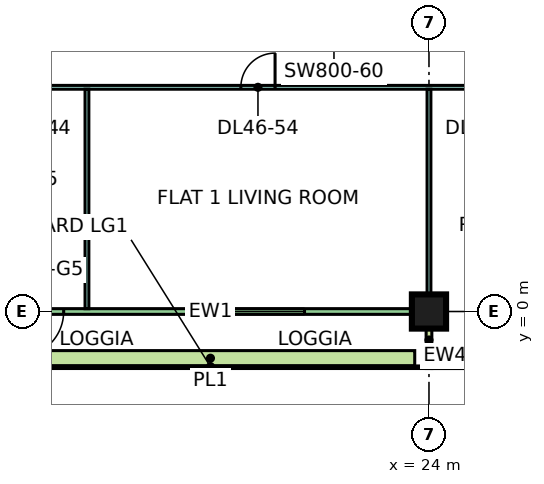
"""IFC4 building model, lengths in metres.
Left out: names, types, materials, properties, quantities, classifications, styles, units other than length and angle.
Written with IfcOpenShell. Run it as: python <this file> out.ifc"""

import sys

from ifc_helpers import new_model, si_unit, direction, frame, frame_2d, origin, origin_2d, place, context, subcontext, project, spatial, rectangle, extrude, element, fill, save


model = new_model("IFC4")
c1 = context("Model", 3, precision=1e-05, world=origin(), true_north=direction((0.0, 1.0)))
c2 = subcontext(c1, "Body", "Model", "MODEL_VIEW")
j1 = project(units=[si_unit("LENGTHUNIT", "METRE"), si_unit("PLANEANGLEUNIT", "RADIAN")], contexts=[c1])
p1 = place(None, origin())
s1 = spatial("IfcSite", under=j1, at=p1, CompositionType="ELEMENT")
p2 = place(p1, origin())
s2 = spatial("IfcBuilding", under=s1, at=p2, CompositionType="ELEMENT")
p3 = place(p2, frame((0.0, 0.0, 198.65)))
s3 = spatial("IfcBuildingStorey", under=s2, at=p3, CompositionType="ELEMENT", Elevation=198.65)
p4 = place(p3, frame((24.0, 0.0, 0.0), z_axis=(0.0, 0.0, 1.0), x_axis=(1.0, 0.0, 0.0)))
e1 = element("IfcColumn", 1, at=p4, inside=s3, PredefinedType="COLUMN", context=c2, shape_type="SweptSolid", body=[
    extrude(rectangle(XDim=0.9, YDim=0.9, at=origin_2d()), origin(), (0.0, 0.0, 1.0), 3.75),
])
p5 = place(p3, frame((12.575, 0.0, 0.0), z_axis=(0.0, 0.0, 1.0), x_axis=(1.0, 0.0, 0.0)))
e2 = element("IfcWall", 2, at=p5, inside=s3, PredefinedType="SOLIDWALL", context=c2, shape_type="SweptSolid", body=[
    extrude(rectangle(XDim=11.35, YDim=0.15, at=frame_2d((5.675, 0.0))), origin(), (0.0, 0.0, 1.0), 3.35),
])
p6 = place(p5, frame((0.613, 0.0, 0.0)))
e3 = element("IfcOpeningElement", 3, at=p6, cuts=e2, PredefinedType="OPENING", context=c2, shape_type="SweptSolid", body=[
    extrude(rectangle(XDim=1.2, YDim=2.4, at=frame_2d((0.6, 1.2))), frame((0.0, 0.085, 0.0), z_axis=(0.0, -1.0, 0.0), x_axis=(1.0, 0.0, 0.0)), (0.0, 0.0, 1.0), 0.17),
])
p7 = place(p5, frame((5.15, 0.0, 0.45)))
e4 = element("IfcOpeningElement", 4, at=p7, cuts=e2, PredefinedType="OPENING", context=c2, shape_type="SweptSolid", body=[
    extrude(rectangle(XDim=3.0, YDim=2.4, at=frame_2d((1.5, 1.2))), frame((0.0, 0.085, 0.0), z_axis=(0.0, -1.0, 0.0), x_axis=(1.0, 0.0, 0.0)), (0.0, 0.0, 1.0), 0.17),
])
p8 = place(p3, frame((24.0, -1.5, 0.0), z_axis=(0.0, 0.0, 1.0), x_axis=(0.0, 1.0, 0.0)))
e5 = element("IfcWall", 5, at=p8, inside=s3, PredefinedType="SOLIDWALL", context=c2, shape_type="SweptSolid", body=[
    extrude(rectangle(XDim=1.5, YDim=0.15, at=frame_2d((0.75, 0.0))), origin(), (0.0, 0.0, 1.0), 3.35),
])
p9 = place(p3, frame((24.075, -1.425, 0.0), z_axis=(0.0, 0.0, 1.0), x_axis=(1.0, 0.0, 0.0)))
e6 = element("IfcWall", 6, at=p9, inside=s3, PredefinedType="SOLIDWALL", context=c2, shape_type="SweptSolid", body=[
    extrude(rectangle(XDim=11.85, YDim=0.15, at=frame_2d((5.925, 0.0))), origin(), (0.0, 0.0, 1.0), 3.35),
])
p10 = place(p9, frame((0.562, 0.0, 0.45)))
e7 = element("IfcOpeningElement", 7, at=p10, cuts=e6, PredefinedType="OPENING", context=c2, shape_type="SweptSolid", body=[
    extrude(rectangle(XDim=1.8, YDim=2.4, at=frame_2d((0.9, 1.2))), frame((0.0, 0.085, 0.0), z_axis=(0.0, -1.0, 0.0), x_axis=(1.0, 0.0, 0.0)), (0.0, 0.0, 1.0), 0.17),
])
p11 = place(p9, frame((3.525, 0.0, 0.45)))
e8 = element("IfcOpeningElement", 8, at=p11, cuts=e6, PredefinedType="OPENING", context=c2, shape_type="SweptSolid", body=[
    extrude(rectangle(XDim=1.8, YDim=2.4, at=frame_2d((0.9, 1.2))), frame((0.0, 0.085, 0.0), z_axis=(0.0, -1.0, 0.0), x_axis=(1.0, 0.0, 0.0)), (0.0, 0.0, 1.0), 0.17),
])
p12 = place(p9, frame((6.525, 0.0, 0.45)))
e9 = element("IfcOpeningElement", 9, at=p12, cuts=e6, PredefinedType="OPENING", context=c2, shape_type="SweptSolid", body=[
    extrude(rectangle(XDim=1.8, YDim=2.4, at=frame_2d((0.9, 1.2))), frame((0.0, 0.085, 0.0), z_axis=(0.0, -1.0, 0.0), x_axis=(1.0, 0.0, 0.0)), (0.0, 0.0, 1.0), 0.17),
])
p13 = place(p9, frame((9.488, 0.0, 0.45)))
e10 = element("IfcOpeningElement", 10, at=p13, cuts=e6, PredefinedType="OPENING", context=c2, shape_type="SweptSolid", body=[
    extrude(rectangle(XDim=1.8, YDim=2.4, at=frame_2d((0.9, 1.2))), frame((0.0, 0.085, 0.0), z_axis=(0.0, -1.0, 0.0), x_axis=(1.0, 0.0, 0.0)), (0.0, 0.0, 1.0), 0.17),
])
p14 = place(p3, frame((12.875, -1.229, 0.0), z_axis=(0.0, 0.0, 1.0), x_axis=(1.0, 0.0, 0.0)))
e11 = element("IfcWall", 11, at=p14, inside=s3, PredefinedType="SOLIDWALL", context=c2, shape_type="SweptSolid", body=[
    extrude(rectangle(XDim=10.75, YDim=0.4, at=frame_2d((5.375, 0.0))), origin(), (0.0, 0.0, 1.0), 0.7),
])
p15 = place(p3, frame((11.95, 5.9, 0.0), z_axis=(0.0, 0.0, 1.0), x_axis=(1.0, 0.0, 0.0)))
e12 = element("IfcWall", 12, at=p15, inside=s3, PredefinedType="PARTITIONING", context=c2, shape_type="SweptSolid", body=[
    extrude(rectangle(XDim=21.1, YDim=0.1, at=frame_2d((10.55, 0.0))), origin(), (0.0, 0.0, 1.0), 3.35),
])
p16 = place(p15, frame((1.1, 0.0, 0.0)))
e13 = element("IfcOpeningElement", 13, at=p16, cuts=e12, PredefinedType="OPENING", context=c2, shape_type="SweptSolid", body=[
    extrude(rectangle(XDim=0.9, YDim=2.1, at=frame_2d((0.45, 1.05))), frame((0.0, 0.06, 0.0), z_axis=(0.0, -1.0, 0.0), x_axis=(1.0, 0.0, 0.0)), (0.0, 0.0, 1.0), 0.12),
])
p17 = place(p15, frame((13.1, 0.0, 0.0)))
e14 = element("IfcOpeningElement", 14, at=p17, cuts=e12, PredefinedType="OPENING", context=c2, shape_type="SweptSolid", body=[
    extrude(rectangle(XDim=0.9, YDim=2.1, at=frame_2d((0.45, 1.05))), frame((0.0, 0.06, 0.0), z_axis=(0.0, -1.0, 0.0), x_axis=(1.0, 0.0, 0.0)), (0.0, 0.0, 1.0), 0.12),
])
p18 = place(p15, frame((16.1, 0.0, 0.0)))
e15 = element("IfcOpeningElement", 15, at=p18, cuts=e12, PredefinedType="OPENING", context=c2, shape_type="SweptSolid", body=[
    extrude(rectangle(XDim=0.9, YDim=2.1, at=frame_2d((0.45, 1.05))), frame((0.0, 0.06, 0.0), z_axis=(0.0, -1.0, 0.0), x_axis=(1.0, 0.0, 0.0)), (0.0, 0.0, 1.0), 0.12),
])
p19 = place(p15, frame((7.1, 0.0, 0.0)))
e16 = element("IfcOpeningElement", 16, at=p19, cuts=e12, PredefinedType="OPENING", context=c2, shape_type="SweptSolid", body=[
    extrude(rectangle(XDim=0.9, YDim=2.1, at=frame_2d((0.45, 1.05))), frame((0.0, 0.06, 0.0), z_axis=(0.0, -1.0, 0.0), x_axis=(1.0, 0.0, 0.0)), (0.0, 0.0, 1.0), 0.12),
])
p20 = place(p3, frame((15.0, 0.074, 0.0), z_axis=(0.0, 0.0, 1.0), x_axis=(0.0, 1.0, 0.0)))
e17 = element("IfcWall", 17, at=p20, inside=s3, PredefinedType="PARTITIONING", context=c2, shape_type="SweptSolid", body=[
    extrude(rectangle(XDim=5.776, YDim=0.1, at=frame_2d((2.888, 0.0))), origin(), (0.0, 0.0, 1.0), 3.35),
])
p21 = place(p3, frame((24.0, 0.0, 0.0), z_axis=(0.0, 0.0, 1.0), x_axis=(0.0, 1.0, 0.0)))
e18 = element("IfcWall", 18, at=p21, inside=s3, PredefinedType="PARTITIONING", context=c2, shape_type="SweptSolid", body=[
    extrude(rectangle(XDim=5.85, YDim=0.1, at=frame_2d((2.925, 0.0))), origin(), (0.0, 0.0, 1.0), 3.35),
])
p22 = place(p6, frame((1.2, 0.0, 0.0), z_axis=(0.0, 0.0, 1.0), x_axis=(-1.0, 0.0, 0.0)))
e19 = element("IfcDoor", 19, at=p22, inside=s3, OperationType="DOUBLE_DOOR_SINGLE_SWING", PredefinedType="DOOR", context=c2, shape_type="SweptSolid", body=[
    extrude(rectangle(XDim=1.2, YDim=2.4, at=frame_2d((0.6, 1.2))), frame((0.0, 0.025, 0.0), z_axis=(0.0, -1.0, 0.0), x_axis=(1.0, 0.0, 0.0)), (0.0, 0.0, 1.0), 0.05),
])
fill(e3, e19)
p23 = place(p7, origin())
e20 = element("IfcWindow", 20, at=p23, inside=s3, PartitioningType="SINGLE_PANEL", PredefinedType="WINDOW", context=c2, shape_type="SweptSolid", body=[
    extrude(rectangle(XDim=3.0, YDim=2.4, at=frame_2d((1.5, 1.2))), frame((0.0, 0.03, 0.0), z_axis=(0.0, -1.0, 0.0), x_axis=(1.0, 0.0, 0.0)), (0.0, 0.0, 1.0), 0.06),
])
fill(e4, e20)
p24 = place(p10, origin())
e21 = element("IfcWindow", 21, at=p24, inside=s3, PartitioningType="SINGLE_PANEL", PredefinedType="WINDOW", context=c2, shape_type="SweptSolid", body=[
    extrude(rectangle(XDim=1.8, YDim=2.4, at=frame_2d((0.9, 1.2))), frame((0.0, 0.03, 0.0), z_axis=(0.0, -1.0, 0.0), x_axis=(1.0, 0.0, 0.0)), (0.0, 0.0, 1.0), 0.06),
])
fill(e7, e21)
p25 = place(p19, frame((0.9, 0.0, 0.0), z_axis=(0.0, 0.0, 1.0), x_axis=(-1.0, 0.0, 0.0)))
e22 = element("IfcDoor", 22, at=p25, inside=s3, OperationType="SINGLE_SWING_RIGHT", PredefinedType="DOOR", context=c2, shape_type="SweptSolid", body=[
    extrude(rectangle(XDim=0.9, YDim=2.1, at=frame_2d((0.45, 1.05))), frame((0.0, 0.025, 0.0), z_axis=(0.0, -1.0, 0.0), x_axis=(1.0, 0.0, 0.0)), (0.0, 0.0, 1.0), 0.05),
])
fill(e16, e22)
save(model, sys.argv[1])
